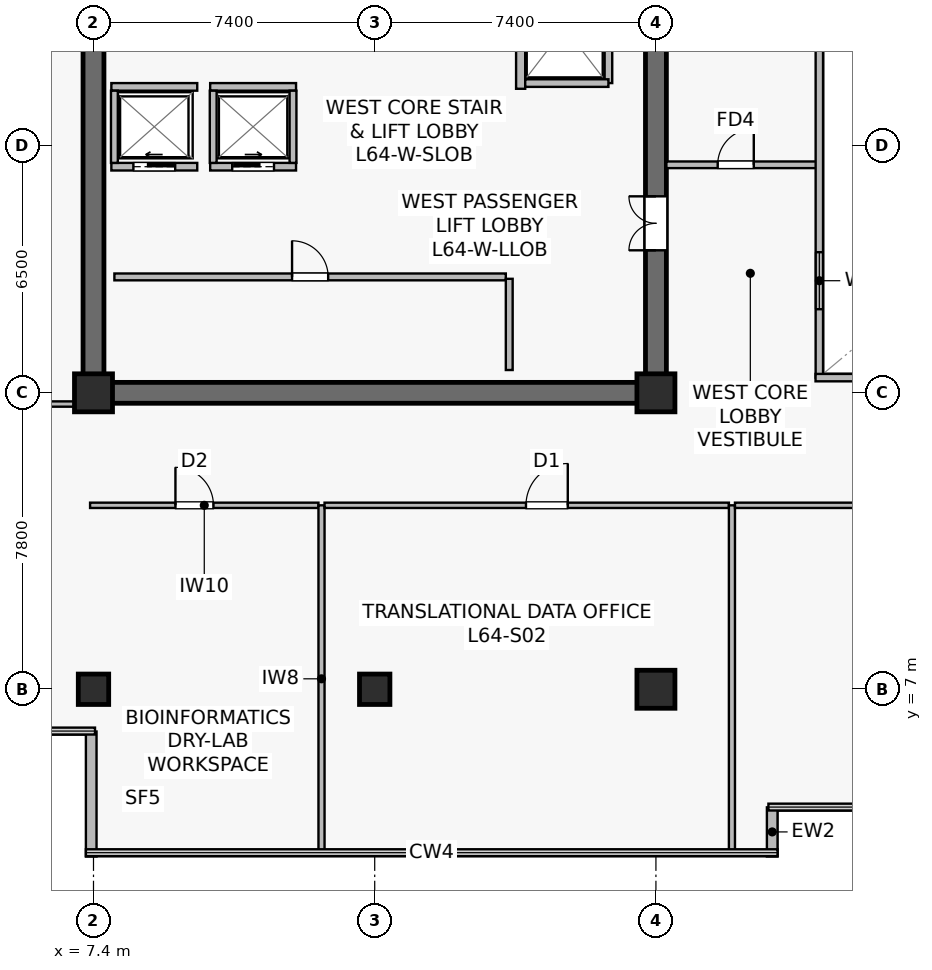
"""IFC4 building model, lengths in metres.
Left out: names, types, materials, properties, quantities, classifications, styles, units other than length and angle.
Written with IfcOpenShell. Run it as: python <this file> out.ifc"""

import sys

from ifc_helpers import new_model, si_unit, direction, frame, frame_2d, origin, origin_2d, place, context, subcontext, project, spatial, rectangle, extrude, source, transform, mapped, element, fill, save


model = new_model("IFC4")
c1 = context("Model", 3, precision=1e-05, world=origin(), true_north=direction((0.0, 1.0)))
c2 = subcontext(c1, "Body", "Model", "MODEL_VIEW")
j1 = project(units=[si_unit("LENGTHUNIT", "METRE"), si_unit("PLANEANGLEUNIT", "RADIAN")], contexts=[c1])
p1 = place(None, origin())
s1 = spatial("IfcSite", under=j1, at=p1, CompositionType="ELEMENT")
p2 = place(p1, origin())
s2 = spatial("IfcBuilding", under=s1, at=p2, CompositionType="ELEMENT")
p3 = place(p2, frame((0.0, 0.0, 267.0)))
s3 = spatial("IfcBuildingStorey", under=s2, at=p3, CompositionType="ELEMENT", Elevation=267.0)
p4 = place(p3, frame((7.125, 14.8, 0.0), z_axis=(0.0, 0.0, 1.0), x_axis=(1.0, 0.0, 0.0)))
e1 = element("IfcWall", 1, at=p4, inside=s3, PredefinedType="SHEAR", context=c2, shape_type="SweptSolid", body=[
    extrude(rectangle(XDim=15.35, YDim=0.55, at=frame_2d((7.675, 0.0))), origin(), (0.0, 0.0, 1.0), 3.8),
])
p5 = place(p3, frame((7.4, 15.075, 0.0), z_axis=(0.0, 0.0, 1.0), x_axis=(0.0, 1.0, 0.0)))
e2 = element("IfcWall", 2, at=p5, inside=s3, PredefinedType="SHEAR", context=c2, shape_type="SweptSolid", body=[
    extrude(rectangle(XDim=18.45, YDim=0.55, at=frame_2d((9.225, 0.0))), origin(), (0.0, 0.0, 1.0), 3.8),
])
p6 = place(p3, frame((22.2, 15.075, 0.0), z_axis=(0.0, 0.0, 1.0), x_axis=(0.0, 1.0, 0.0)))
e3 = element("IfcWall", 3, at=p6, inside=s3, PredefinedType="SHEAR", context=c2, shape_type="SweptSolid", body=[
    extrude(rectangle(XDim=18.45, YDim=0.55, at=frame_2d((9.225, 0.0))), origin(), (0.0, 0.0, 1.0), 3.8),
])
p7 = place(p6, frame((3.475, 0.0, 0.0)))
e4 = element("IfcOpeningElement", 4, at=p7, cuts=e3, PredefinedType="OPENING", context=c2, shape_type="SweptSolid", body=[
    extrude(rectangle(XDim=1.42, YDim=2.2, at=frame_2d((0.71, 1.1))), frame((0.0, 0.285, 0.0), z_axis=(0.0, -1.0, 0.0), x_axis=(1.0, 0.0, 0.0)), (0.0, 0.0, 1.0), 0.57),
])
m1 = source(origin(), c2, "Body", "SweptSolid", [
    extrude(rectangle(XDim=0.8, YDim=0.8, at=origin_2d()), origin(), (0.0, 0.0, 1.0), 4.1),
])
p8 = place(p3, frame((14.8, 7.0, 0.0), z_axis=(0.0, 0.0, 1.0), x_axis=(1.0, 0.0, 0.0)))
e5 = element("IfcColumn", 5, at=p8, inside=s3, PredefinedType="COLUMN", context=c2, shape_type="MappedRepresentation", body=[
    mapped(m1, transform((0.0, 0.0, 0.0), scale=1.0)),
])
m2 = source(origin(), c2, "Body", "SweptSolid", [
    extrude(rectangle(XDim=1.0, YDim=1.0, at=origin_2d()), origin(), (0.0, 0.0, 1.0), 4.1),
])
for number, where, z_axis, x_axis in (
    (6, (22.2, 7.0, 0.0), (0.0, 0.0, 1.0), (1.0, 0.0, 0.0)),
    (7, (7.4, 14.8, 0.0), (0.0, 0.0, 1.0), (1.0, 0.0, 0.0)),
    (8, (22.2, 14.8, 0.0), (0.0, 0.0, 1.0), (1.0, 0.0, 0.0)),
):
    element("IfcColumn", number, at=place(p3, frame(where, z_axis=z_axis, x_axis=x_axis)), inside=s3, PredefinedType="COLUMN", context=c2, shape_type="MappedRepresentation", body=[
        mapped(m2, transform((0.0, 0.0, 0.0), scale=1.0)),
    ])
p9 = place(p3, frame((7.4, 7.0, 0.0), z_axis=(0.0, 0.0, 1.0), x_axis=(1.0, 0.0, 0.0)))
e9 = element("IfcColumn", 9, at=p9, inside=s3, PredefinedType="COLUMN", context=c2, shape_type="MappedRepresentation", body=[
    mapped(m1, transform((0.0, 0.0, 0.0), scale=1.0)),
])
p10 = place(p3, frame((25.26, 2.6, 0.0), z_axis=(0.0, 0.0, 1.0), x_axis=(0.0, 1.0, 0.0)))
e10 = element("IfcWall", 10, at=p10, inside=s3, PredefinedType="STANDARD", context=c2, shape_type="SweptSolid", body=[
    extrude(rectangle(XDim=1.293, YDim=0.28, at=frame_2d((0.646, 0.0))), origin(), (0.0, 0.0, 1.0), 3.8),
])
p11 = place(p3, frame((7.34, 5.888, 0.0), z_axis=(0.0, 0.0, 1.0), x_axis=(0.0, -1.0, 0.0)))
e11 = element("IfcWall", 11, at=p11, inside=s3, PredefinedType="STANDARD", context=c2, shape_type="SweptSolid", body=[
    extrude(rectangle(XDim=3.288, YDim=0.28, at=frame_2d((1.644, 0.0))), origin(), (0.0, 0.0, 1.0), 3.8),
])
p12 = place(p3, frame((18.64, 22.8, 0.0), z_axis=(0.0, 0.0, 1.0), x_axis=(0.0, 1.0, 0.0)))
e12 = element("IfcWall", 12, at=p12, inside=s3, PredefinedType="SOLIDWALL", context=c2, shape_type="SweptSolid", body=[
    extrude(rectangle(XDim=6.85, YDim=0.24, at=frame_2d((3.425, 0.0))), origin(), (0.0, 0.0, 1.0), 2.935),
])
p13 = place(p12, frame((4.85, 0.0, 0.0)))
e13 = element("IfcOpeningElement", 13, at=p13, cuts=e12, PredefinedType="OPENING", context=c2, shape_type="SweptSolid", body=[
    extrude(rectangle(XDim=1.1, YDim=2.22, at=frame_2d((0.55, 1.11))), frame((0.0, 0.13, 0.0), z_axis=(0.0, -1.0, 0.0), x_axis=(1.0, 0.0, 0.0)), (0.0, 0.0, 1.0), 0.26),
])
p14 = place(p12, frame((1.0, 0.0, 0.0)))
e14 = element("IfcOpeningElement", 14, at=p14, cuts=e12, PredefinedType="OPENING", context=c2, shape_type="SweptSolid", body=[
    extrude(rectangle(XDim=1.2, YDim=2.22, at=frame_2d((0.6, 1.11))), frame((0.0, 0.13, 0.0), z_axis=(0.0, -1.0, 0.0), x_axis=(1.0, 0.0, 0.0)), (0.0, 0.0, 1.0), 0.26),
])
p15 = place(p3, frame((7.87, 20.75, 0.0), z_axis=(0.0, 0.0, 1.0), x_axis=(1.0, 0.0, 0.0)))
e15 = element("IfcWall", 15, at=p15, inside=s3, PredefinedType="SOLIDWALL", context=c2, shape_type="SweptSolid", body=[
    extrude(rectangle(XDim=2.26, YDim=0.2, at=frame_2d((1.13, 0.0))), origin(), (0.0, 0.0, 1.0), 3.8),
])
p16 = place(p15, frame((0.58, 0.0, 0.0)))
e16 = element("IfcOpeningElement", 16, at=p16, cuts=e15, PredefinedType="OPENING", context=c2, shape_type="SweptSolid", body=[
    extrude(rectangle(XDim=1.1, YDim=2.22, at=frame_2d((0.55, 1.11))), frame((0.0, 0.11, 0.0), z_axis=(0.0, -1.0, 0.0), x_axis=(1.0, 0.0, 0.0)), (0.0, 0.0, 1.0), 0.22),
])
p17 = place(p3, frame((7.87, 22.85, 0.0), z_axis=(0.0, 0.0, 1.0), x_axis=(1.0, 0.0, 0.0)))
e17 = element("IfcWall", 17, at=p17, inside=s3, PredefinedType="SOLIDWALL", context=c2, shape_type="SweptSolid", body=[
    extrude(rectangle(XDim=2.26, YDim=0.2, at=frame_2d((1.13, 0.0))), origin(), (0.0, 0.0, 1.0), 3.8),
])
p18 = place(p3, frame((7.95, 20.85, 0.0), z_axis=(0.0, 0.0, 1.0), x_axis=(0.0, 1.0, 0.0)))
e18 = element("IfcWall", 18, at=p18, inside=s3, PredefinedType="SOLIDWALL", context=c2, shape_type="SweptSolid", body=[
    extrude(rectangle(XDim=1.9, YDim=0.18, at=frame_2d((0.95, 0.0))), origin(), (0.0, 0.0, 1.0), 3.8),
])
p19 = place(p3, frame((10.47, 20.75, 0.0), z_axis=(0.0, 0.0, 1.0), x_axis=(1.0, 0.0, 0.0)))
e19 = element("IfcWall", 19, at=p19, inside=s3, PredefinedType="SOLIDWALL", context=c2, shape_type="SweptSolid", body=[
    extrude(rectangle(XDim=2.26, YDim=0.2, at=frame_2d((1.13, 0.0))), origin(), (0.0, 0.0, 1.0), 3.8),
])
p20 = place(p19, frame((0.58, 0.0, 0.0)))
e20 = element("IfcOpeningElement", 20, at=p20, cuts=e19, PredefinedType="OPENING", context=c2, shape_type="SweptSolid", body=[
    extrude(rectangle(XDim=1.1, YDim=2.22, at=frame_2d((0.55, 1.11))), frame((0.0, 0.11, 0.0), z_axis=(0.0, -1.0, 0.0), x_axis=(1.0, 0.0, 0.0)), (0.0, 0.0, 1.0), 0.22),
])
p21 = place(p3, frame((10.47, 22.85, 0.0), z_axis=(0.0, 0.0, 1.0), x_axis=(1.0, 0.0, 0.0)))
e21 = element("IfcWall", 21, at=p21, inside=s3, PredefinedType="SOLIDWALL", context=c2, shape_type="SweptSolid", body=[
    extrude(rectangle(XDim=2.26, YDim=0.2, at=frame_2d((1.13, 0.0))), origin(), (0.0, 0.0, 1.0), 3.8),
])
for number, where, z_axis, x_axis in (
    (22, (10.55, 20.85, 0.0), (0.0, 0.0, 1.0), (0.0, 1.0, 0.0)),
    (23, (12.65, 20.85, 0.0), (0.0, 0.0, 1.0), (0.0, 1.0, 0.0)),
):
    element("IfcWall", number, at=place(p3, frame(where, z_axis=z_axis, x_axis=x_axis)), inside=s3, PredefinedType="SOLIDWALL", context=c2, shape_type="SweptSolid", body=[
        extrude(rectangle(XDim=1.9, YDim=0.18, at=frame_2d((0.95, 0.0))), origin(), (0.0, 0.0, 1.0), 3.8),
    ])
p22 = place(p3, frame((20.95, 22.95, 0.0), z_axis=(0.0, 0.0, 1.0), x_axis=(0.0, 1.0, 0.0)))
e24 = element("IfcWall", 24, at=p22, inside=s3, PredefinedType="SOLIDWALL", context=c2, shape_type="SweptSolid", body=[
    extrude(rectangle(XDim=2.9, YDim=0.2, at=frame_2d((1.45, 0.0))), origin(), (0.0, 0.0, 1.0), 2.935),
])
p23 = place(p3, frame((18.76, 22.95, 0.0), z_axis=(0.0, 0.0, 1.0), x_axis=(1.0, 0.0, 0.0)))
e25 = element("IfcWall", 25, at=p23, inside=s3, PredefinedType="SOLIDWALL", context=c2, shape_type="SweptSolid", body=[
    extrude(rectangle(XDim=2.19, YDim=0.2, at=frame_2d((1.095, 0.0))), origin(), (0.0, 0.0, 1.0), 3.8),
])
p24 = place(p3, frame((7.95, 17.85, 0.0), z_axis=(0.0, 0.0, 1.0), x_axis=(1.0, 0.0, 0.0)))
e26 = element("IfcWall", 26, at=p24, inside=s3, PredefinedType="SOLIDWALL", context=c2, shape_type="SweptSolid", body=[
    extrude(rectangle(XDim=10.3, YDim=0.18, at=frame_2d((5.15, 0.0))), origin(), (0.0, 0.0, 1.0), 3.197),
])
p25 = place(p24, frame((4.675, 0.0, 0.0)))
e27 = element("IfcOpeningElement", 27, at=p25, cuts=e26, PredefinedType="OPENING", context=c2, shape_type="SweptSolid", body=[
    extrude(rectangle(XDim=0.95, YDim=2.15, at=frame_2d((0.475, 1.075))), frame((0.0, 0.1, 0.0), z_axis=(0.0, -1.0, 0.0), x_axis=(1.0, 0.0, 0.0)), (0.0, 0.0, 1.0), 0.2),
])
p26 = place(p3, frame((18.34, 15.4, 0.0), z_axis=(0.0, 0.0, 1.0), x_axis=(0.0, 1.0, 0.0)))
e28 = element("IfcWall", 28, at=p26, inside=s3, PredefinedType="SOLIDWALL", context=c2, shape_type="SweptSolid", body=[
    extrude(rectangle(XDim=2.4, YDim=0.18, at=frame_2d((1.2, 0.0))), origin(), (0.0, 0.0, 1.0), 3.8),
])
p27 = place(p3, frame((22.475, 20.8, 0.0), z_axis=(0.0, 0.0, 1.0), x_axis=(1.0, 0.0, 0.0)))
e29 = element("IfcWall", 29, at=p27, inside=s3, PredefinedType="PARTITIONING", context=c2, shape_type="SweptSolid", body=[
    extrude(rectangle(XDim=4.025, YDim=0.175, at=frame_2d((2.012, 0.0))), origin(), (0.0, 0.0, 1.0), 3.8),
])
p28 = place(p27, frame((1.35, 0.0, 0.0)))
e30 = element("IfcOpeningElement", 30, at=p28, cuts=e29, PredefinedType="OPENING", context=c2, shape_type="SweptSolid", body=[
    extrude(rectangle(XDim=0.95, YDim=2.15, at=frame_2d((0.475, 1.075))), frame((0.0, 0.098, 0.0), z_axis=(0.0, -1.0, 0.0), x_axis=(1.0, 0.0, 0.0)), (0.0, 0.0, 1.0), 0.195),
])
p29 = place(p3, frame((26.5, 15.2, 0.0), z_axis=(0.0, 0.0, 1.0), x_axis=(0.0, 1.0, 0.0)))
e31 = element("IfcWall", 31, at=p29, inside=s3, PredefinedType="SOLIDWALL", context=c2, shape_type="SweptSolid", body=[
    extrude(rectangle(XDim=18.2, YDim=0.195, at=frame_2d((9.1, 0.0))), origin(), (0.0, 0.0, 1.0), 3.8),
])
p30 = place(p29, frame((1.8, 0.0, 0.9)))
e32 = element("IfcOpeningElement", 32, at=p30, cuts=e31, PredefinedType="OPENING", context=c2, shape_type="SweptSolid", body=[
    extrude(rectangle(XDim=1.5, YDim=1.4, at=frame_2d((0.75, 0.7))), frame((0.0, 0.107, 0.0), z_axis=(0.0, -1.0, 0.0), x_axis=(1.0, 0.0, 0.0)), (0.0, 0.0, 1.0), 0.215),
])
p31 = place(p29, frame((13.2, 0.0, 0.9)))
e33 = element("IfcOpeningElement", 33, at=p31, cuts=e31, PredefinedType="OPENING", context=c2, shape_type="SweptSolid", body=[
    extrude(rectangle(XDim=1.5, YDim=1.4, at=frame_2d((0.75, 0.7))), frame((0.0, 0.107, 0.0), z_axis=(0.0, -1.0, 0.0), x_axis=(1.0, 0.0, 0.0)), (0.0, 0.0, 1.0), 0.215),
])
p32 = place(p3, frame((26.4, 15.2, 0.0), z_axis=(0.0, 0.0, 1.0), x_axis=(1.0, 0.0, 0.0)))
e34 = element("IfcWall", 34, at=p32, inside=s3, PredefinedType="SOLIDWALL", context=c2, shape_type="SweptSolid", body=[
    extrude(rectangle(XDim=22.0, YDim=0.195, at=frame_2d((11.0, 0.0))), origin(), (0.0, 0.0, 1.0), 3.8),
])
p33 = place(p3, frame((7.31, 11.84, 0.0), z_axis=(0.0, 0.0, 1.0), x_axis=(1.0, 0.0, 0.0)))
e35 = element("IfcWall", 35, at=p33, inside=s3, PredefinedType="PARTITIONING", context=c2, shape_type="SweptSolid", body=[
    extrude(rectangle(XDim=6.01, YDim=0.14, at=frame_2d((3.005, 0.0))), origin(), (0.0, 0.0, 1.0), 3.335),
])
p34 = place(p33, frame((2.246, 0.0, 0.0)))
e36 = element("IfcOpeningElement", 36, at=p34, cuts=e35, PredefinedType="OPENING", context=c2, shape_type="SweptSolid", body=[
    extrude(rectangle(XDim=1.0, YDim=2.15, at=frame_2d((0.5, 1.075))), frame((0.0, 0.08, 0.0), z_axis=(0.0, -1.0, 0.0), x_axis=(1.0, 0.0, 0.0)), (0.0, 0.0, 1.0), 0.16),
])
p35 = place(p3, frame((13.4, 2.71, 0.0), z_axis=(0.0, 0.0, 1.0), x_axis=(0.0, 1.0, 0.0)))
e37 = element("IfcWall", 37, at=p35, inside=s3, PredefinedType="PARTITIONING", context=c2, shape_type="SweptSolid", body=[
    extrude(rectangle(XDim=9.13, YDim=0.16, at=frame_2d((4.565, 0.0))), origin(), (0.0, 0.0, 1.0), 3.135),
])
p36 = place(p3, frame((13.48, 11.84, 0.0), z_axis=(0.0, 0.0, 1.0), x_axis=(1.0, 0.0, 0.0)))
e38 = element("IfcWall", 38, at=p36, inside=s3, PredefinedType="PARTITIONING", context=c2, shape_type="SweptSolid", body=[
    extrude(rectangle(XDim=10.64, YDim=0.14, at=frame_2d((5.32, 0.0))), origin(), (0.0, 0.0, 1.0), 3.197),
])
p37 = place(p36, frame((5.3, 0.0, 0.0)))
e39 = element("IfcOpeningElement", 39, at=p37, cuts=e38, PredefinedType="OPENING", context=c2, shape_type="SweptSolid", body=[
    extrude(rectangle(XDim=1.1, YDim=2.18, at=frame_2d((0.55, 1.09))), frame((0.0, 0.08, 0.0), z_axis=(0.0, -1.0, 0.0), x_axis=(1.0, 0.0, 0.0)), (0.0, 0.0, 1.0), 0.16),
])
p38 = place(p3, frame((24.2, 2.71, 0.0), z_axis=(0.0, 0.0, 1.0), x_axis=(0.0, 1.0, 0.0)))
e40 = element("IfcWall", 40, at=p38, inside=s3, PredefinedType="PARTITIONING", context=c2, shape_type="SweptSolid", body=[
    extrude(rectangle(XDim=9.13, YDim=0.16, at=frame_2d((4.565, 0.0))), origin(), (0.0, 0.0, 1.0), 3.135),
])
p39 = place(p3, frame((24.28, 11.84, 0.0), z_axis=(0.0, 0.0, 1.0), x_axis=(1.0, 0.0, 0.0)))
e41 = element("IfcWall", 41, at=p39, inside=s3, PredefinedType="PARTITIONING", context=c2, shape_type="SweptSolid", body=[
    extrude(rectangle(XDim=13.44, YDim=0.14, at=frame_2d((6.72, 0.0))), origin(), (0.0, 0.0, 1.0), 3.197),
])
p40 = place(p39, frame((5.472, 0.0, 0.0)))
e42 = element("IfcOpeningElement", 42, at=p40, cuts=e41, PredefinedType="OPENING", context=c2, shape_type="SweptSolid", body=[
    extrude(rectangle(XDim=1.1, YDim=2.18, at=frame_2d((0.55, 1.09))), frame((0.0, 0.08, 0.0), z_axis=(0.0, -1.0, 0.0), x_axis=(1.0, 0.0, 0.0)), (0.0, 0.0, 1.0), 0.16),
])
p41 = place(p3, frame((4.11, 14.505, 0.0), z_axis=(0.0, 0.0, 1.0), x_axis=(1.0, 0.0, 0.0)))
e43 = element("IfcWall", 43, at=p41, inside=s3, PredefinedType="PARTITIONING", context=c2, shape_type="SweptSolid", body=[
    extrude(rectangle(XDim=2.91, YDim=0.14, at=frame_2d((1.455, 0.0))), origin(), (0.0, 0.0, 1.0), 3.8),
])
p42 = place(p41, frame((1.005, 0.0, 0.0)))
e44 = element("IfcOpeningElement", 44, at=p42, cuts=e43, PredefinedType="OPENING", context=c2, shape_type="SweptSolid", body=[
    extrude(rectangle(XDim=0.9, YDim=2.1, at=frame_2d((0.45, 1.05))), frame((0.0, 0.08, 0.0), z_axis=(0.0, -1.0, 0.0), x_axis=(1.0, 0.0, 0.0)), (0.0, 0.0, 1.0), 0.16),
])
m3 = source(origin(), c2, "Body", "SweptSolid", [
    extrude(rectangle(XDim=1.5, YDim=1.4, at=frame_2d((0.75, 0.7))), frame((0.0, 0.03, 0.0), z_axis=(0.0, -1.0, 0.0), x_axis=(1.0, 0.0, 0.0)), (0.0, 0.0, 1.0), 0.06),
])
p43 = place(p30, origin())
e45 = element("IfcWindow", 45, at=p43, inside=s3, PartitioningType="SINGLE_PANEL", PredefinedType="WINDOW", context=c2, shape_type="MappedRepresentation", body=[
    mapped(m3, transform((0.0, 0.0, 0.0), scale=1.0)),
])
fill(e32, e45)
m4 = source(origin(), c2, "Body", "SweptSolid", [
    extrude(rectangle(XDim=1.1, YDim=2.22, at=frame_2d((0.55, 1.11))), frame((0.0, 0.025, 0.0), z_axis=(0.0, -1.0, 0.0), x_axis=(1.0, 0.0, 0.0)), (0.0, 0.0, 1.0), 0.05),
])
p44 = place(p16, origin())
e46 = element("IfcDoor", 46, at=p44, inside=s3, OperationType="SLIDING_TO_LEFT", PredefinedType="USERDEFINED", context=c2, shape_type="MappedRepresentation", body=[
    mapped(m4, transform((0.0, 0.0, 0.0), scale=1.0)),
])
fill(e16, e46)
p45 = place(p20, origin())
e47 = element("IfcDoor", 47, at=p45, inside=s3, OperationType="SLIDING_TO_RIGHT", PredefinedType="USERDEFINED", context=c2, shape_type="MappedRepresentation", body=[
    mapped(m4, transform((0.0, 0.0, 0.0), scale=1.0)),
])
fill(e20, e47)
m5 = source(origin(), c2, "Body", "SweptSolid", [
    extrude(rectangle(XDim=0.95, YDim=2.15, at=frame_2d((0.475, 1.075))), frame((0.0, 0.025, 0.0), z_axis=(0.0, -1.0, 0.0), x_axis=(1.0, 0.0, 0.0)), (0.0, 0.0, 1.0), 0.05),
])
p46 = place(p25, origin())
e48 = element("IfcDoor", 48, at=p46, inside=s3, OperationType="SINGLE_SWING_LEFT", PredefinedType="DOOR", context=c2, shape_type="MappedRepresentation", body=[
    mapped(m5, transform((0.0, 0.0, 0.0), scale=1.0)),
])
fill(e27, e48)
m6 = source(origin(), c2, "Body", "SweptSolid", [
    extrude(rectangle(XDim=1.42, YDim=2.2, at=frame_2d((0.71, 1.1))), frame((0.0, 0.025, 0.0), z_axis=(0.0, -1.0, 0.0), x_axis=(1.0, 0.0, 0.0)), (0.0, 0.0, 1.0), 0.05),
])
p47 = place(p7, origin())
e49 = element("IfcDoor", 49, at=p47, inside=s3, OperationType="DOUBLE_DOOR_SINGLE_SWING", PredefinedType="DOOR", context=c2, shape_type="MappedRepresentation", body=[
    mapped(m6, transform((0.0, 0.0, 0.0), scale=1.0)),
])
fill(e4, e49)
p48 = place(p28, origin())
e50 = element("IfcDoor", 50, at=p48, inside=s3, OperationType="SINGLE_SWING_RIGHT", PredefinedType="DOOR", context=c2, shape_type="MappedRepresentation", body=[
    mapped(m5, transform((0.0, 0.0, 0.0), scale=1.0)),
])
fill(e30, e50)
m7 = source(origin(), c2, "Body", "SweptSolid", [
    extrude(rectangle(XDim=1.0, YDim=2.15, at=frame_2d((0.5, 1.075))), frame((0.0, 0.025, 0.0), z_axis=(0.0, -1.0, 0.0), x_axis=(1.0, 0.0, 0.0)), (0.0, 0.0, 1.0), 0.05),
])
p49 = place(p34, origin())
e51 = element("IfcDoor", 51, at=p49, inside=s3, OperationType="SINGLE_SWING_LEFT", PredefinedType="DOOR", context=c2, shape_type="MappedRepresentation", body=[
    mapped(m7, transform((0.0, 0.0, 0.0), scale=1.0)),
])
fill(e36, e51)
m8 = source(origin(), c2, "Body", "SweptSolid", [
    extrude(rectangle(XDim=1.1, YDim=2.18, at=frame_2d((0.55, 1.09))), frame((0.0, 0.025, 0.0), z_axis=(0.0, -1.0, 0.0), x_axis=(1.0, 0.0, 0.0)), (0.0, 0.0, 1.0), 0.05),
])
p50 = place(p37, origin())
e52 = element("IfcDoor", 52, at=p50, inside=s3, OperationType="SINGLE_SWING_RIGHT", PredefinedType="DOOR", context=c2, shape_type="MappedRepresentation", body=[
    mapped(m8, transform((0.0, 0.0, 0.0), scale=1.0)),
])
fill(e39, e52)
save(model, sys.argv[1])
